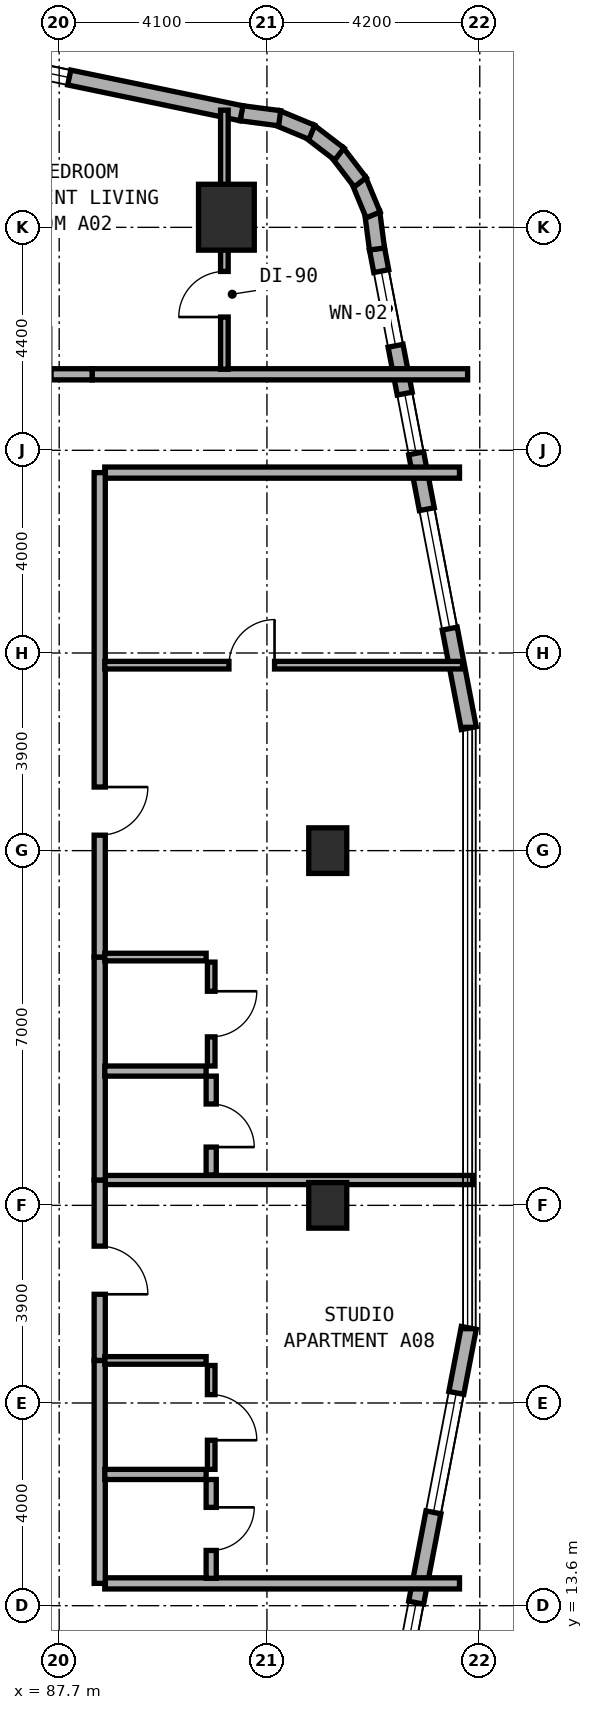
"""IFC4 building model, lengths in metres.
Left out: names, types, materials, properties, quantities, classifications, styles, units other than length and angle.
Written with IfcOpenShell. Run it as: python <this file> out.ifc"""

import sys

from ifc_helpers import new_model, si_unit, direction, frame, frame_2d, origin, origin_2d, place, context, subcontext, project, spatial, rectangle, extrude, element, fill, save


model = new_model("IFC4")
c1 = context("Model", 3, precision=1e-05, world=origin(), true_north=direction((0.0, 1.0)))
c2 = subcontext(c1, "Body", "Model", "MODEL_VIEW")
j1 = project(units=[si_unit("LENGTHUNIT", "METRE"), si_unit("PLANEANGLEUNIT", "RADIAN")], contexts=[c1])
p1 = place(None, origin())
s1 = spatial("IfcSite", under=j1, at=p1, CompositionType="ELEMENT")
p2 = place(p1, origin())
s2 = spatial("IfcBuilding", under=s1, at=p2, CompositionType="ELEMENT")
p3 = place(p2, frame((0.0, 0.0, 38.0)))
s3 = spatial("IfcBuildingStorey", under=s2, at=p3, CompositionType="ELEMENT", Elevation=38.0)
for number, where, z_axis, x_axis in (
    (1, (93.0, 21.5, 0.0), (0.0, 0.0, 1.0), (1.0, 0.0, 0.0)),
    (2, (93.0, 28.5, 0.0), (0.0, 0.0, 1.0), (1.0, 0.0, 0.0)),
):
    element("IfcColumn", number, at=place(p3, frame(where, z_axis=z_axis, x_axis=x_axis)), inside=s3, PredefinedType="COLUMN", context=c2, shape_type="SweptSolid", body=[
        extrude(rectangle(XDim=0.75, YDim=0.9, at=origin_2d()), origin(), (0.0, 0.0, 1.0), 3.5),
    ])
p4 = place(p3, frame((91.0, 41.0, 0.0), z_axis=(0.0, 0.0, 1.0), x_axis=(1.0, 0.0, 0.0)))
e3 = element("IfcColumn", 3, at=p4, inside=s3, PredefinedType="COLUMN", context=c2, shape_type="SweptSolid", body=[
    extrude(rectangle(XDim=1.1, YDim=1.3, at=origin_2d()), origin(), (0.0, 0.0, 1.0), 3.5),
])
p5 = place(p3, frame((93.971, 9.62, 0.0), z_axis=(0.0, 0.0, 1.0), x_axis=(0.188087874316, 0.982152203854, 0.0)))
e4 = element("IfcWall", 4, at=p5, inside=s3, PredefinedType="STANDARD", context=c2, shape_type="SweptSolid", body=[
    extrude(rectangle(XDim=9.634, YDim=0.3, at=frame_2d((4.817, 0.0))), origin(), (0.0, 0.0, 1.0), 3.25),
])
p6 = place(p5, frame((0.452, 0.0, 0.85)))
e5 = element("IfcOpeningElement", 5, at=p6, cuts=e4, PredefinedType="OPENING", context=c2, shape_type="SweptSolid", body=[
    extrude(rectangle(XDim=1.5, YDim=1.5, at=frame_2d((0.75, 0.75))), frame((0.0, 0.16, 0.0), z_axis=(0.0, -1.0, 0.0), x_axis=(1.0, 0.0, 0.0)), (0.0, 0.0, 1.0), 0.32),
])
p7 = place(p5, frame((2.913, 0.0, 0.85)))
e6 = element("IfcOpeningElement", 6, at=p7, cuts=e4, PredefinedType="OPENING", context=c2, shape_type="SweptSolid", body=[
    extrude(rectangle(XDim=1.2, YDim=1.5, at=frame_2d((0.6, 0.75))), frame((0.0, 0.16, 0.0), z_axis=(0.0, -1.0, 0.0), x_axis=(1.0, 0.0, 0.0)), (0.0, 0.0, 1.0), 0.32),
])
p8 = place(p5, frame((5.928, 0.0, 0.8)))
e7 = element("IfcOpeningElement", 7, at=p8, cuts=e4, PredefinedType="OPENING", context=c2, shape_type="SweptSolid", body=[
    extrude(rectangle(XDim=2.4, YDim=1.6, at=frame_2d((1.2, 0.8))), frame((0.0, 0.16, 0.0), z_axis=(0.0, -1.0, 0.0), x_axis=(1.0, 0.0, 0.0)), (0.0, 0.0, 1.0), 0.32),
])
p9 = place(p3, frame((95.783, 30.918, 0.0), z_axis=(0.0, 0.0, 1.0), x_axis=(-0.188087874316, 0.982152203854, 0.0)))
e8 = element("IfcWall", 8, at=p9, inside=s3, PredefinedType="STANDARD", context=c2, shape_type="SweptSolid", body=[
    extrude(rectangle(XDim=9.634, YDim=0.3, at=frame_2d((4.817, 0.0))), origin(), (0.0, 0.0, 1.0), 3.25),
])
p10 = place(p9, frame((1.999, 0.0, 0.8)))
e9 = element("IfcOpeningElement", 9, at=p10, cuts=e8, PredefinedType="OPENING", context=c2, shape_type="SweptSolid", body=[
    extrude(rectangle(XDim=2.4, YDim=1.6, at=frame_2d((1.2, 0.8))), frame((0.0, 0.16, 0.0), z_axis=(0.0, -1.0, 0.0), x_axis=(1.0, 0.0, 0.0)), (0.0, 0.0, 1.0), 0.32),
])
p11 = place(p9, frame((5.521, 0.0, 0.85)))
e10 = element("IfcOpeningElement", 10, at=p11, cuts=e8, PredefinedType="OPENING", context=c2, shape_type="SweptSolid", body=[
    extrude(rectangle(XDim=1.2, YDim=1.5, at=frame_2d((0.6, 0.75))), frame((0.0, 0.16, 0.0), z_axis=(0.0, -1.0, 0.0), x_axis=(1.0, 0.0, 0.0)), (0.0, 0.0, 1.0), 0.32),
])
p12 = place(p9, frame((7.682, 0.0, 0.85)))
e11 = element("IfcOpeningElement", 11, at=p12, cuts=e8, PredefinedType="OPENING", context=c2, shape_type="SweptSolid", body=[
    extrude(rectangle(XDim=1.5, YDim=1.5, at=frame_2d((0.75, 0.75))), frame((0.0, 0.16, 0.0), z_axis=(0.0, -1.0, 0.0), x_axis=(1.0, 0.0, 0.0)), (0.0, 0.0, 1.0), 0.32),
])
p13 = place(p3, frame((93.972, 40.373, 0.0), z_axis=(0.0, 0.0, 1.0), x_axis=(-0.130255288807, 0.991480488834, 0.0)))
e12 = element("IfcWall", 12, at=p13, inside=s3, PredefinedType="STANDARD", context=c2, shape_type="SweptSolid", body=[
    extrude(rectangle(XDim=0.729, YDim=0.3, at=frame_2d((0.365, 0.0))), origin(), (0.0, 0.0, 1.0), 3.25),
])
p14 = place(p3, frame((93.896, 41.045, 0.0), z_axis=(0.0, 0.0, 1.0), x_axis=(-0.383267045233, 0.923637576129, 0.0)))
e13 = element("IfcWall", 13, at=p14, inside=s3, PredefinedType="STANDARD", context=c2, shape_type="SweptSolid", body=[
    extrude(rectangle(XDim=0.746, YDim=0.3, at=frame_2d((0.373, 0.0))), origin(), (0.0, 0.0, 1.0), 3.25),
])
for number, where, z_axis, x_axis in (
    (14, (93.641, 41.689, 0.0), (0.0, 0.0, 1.0), (-0.609, 0.793, 0.0)),
    (15, (93.229, 42.246, 0.0), (0.0, 0.0, 1.0), (-0.794, 0.608, 0.0)),
):
    element("IfcWall", number, at=place(p3, frame(where, z_axis=z_axis, x_axis=x_axis)), inside=s3, PredefinedType="STANDARD", context=c2, shape_type="SweptSolid", body=[
        extrude(rectangle(XDim=0.746, YDim=0.3, at=frame_2d((0.373, 0.0))), origin(), (0.0, 0.0, 1.0), 3.25),
    ])
p15 = place(p3, frame((92.686, 42.676, 0.0), z_axis=(0.0, 0.0, 1.0), x_axis=(-0.923637576129, 0.383267045233, 0.0)))
e16 = element("IfcWall", 16, at=p15, inside=s3, PredefinedType="STANDARD", context=c2, shape_type="SweptSolid", body=[
    extrude(rectangle(XDim=0.746, YDim=0.3, at=frame_2d((0.373, 0.0))), origin(), (0.0, 0.0, 1.0), 3.25),
])
p16 = place(p3, frame((92.051, 42.953, 0.0), z_axis=(0.0, 0.0, 1.0), x_axis=(-0.991559404866, 0.129653178221, 0.0)))
e17 = element("IfcWall", 17, at=p16, inside=s3, PredefinedType="STANDARD", context=c2, shape_type="SweptSolid", body=[
    extrude(rectangle(XDim=0.764, YDim=0.3, at=frame_2d((0.382, 0.0))), origin(), (0.0, 0.0, 1.0), 3.25),
])
p17 = place(p3, frame((91.298, 43.051, 0.0), z_axis=(0.0, 0.0, 1.0), x_axis=(-0.979128391325, 0.203242695569, 0.0)))
e18 = element("IfcWall", 18, at=p17, inside=s3, PredefinedType="STANDARD", context=c2, shape_type="SweptSolid", body=[
    extrude(rectangle(XDim=8.92, YDim=0.3, at=frame_2d((4.46, 0.0))), origin(), (0.0, 0.0, 1.0), 3.25),
])
p18 = place(p17, frame((3.472, 0.0, 0.8)))
e19 = element("IfcOpeningElement", 19, at=p18, cuts=e18, PredefinedType="OPENING", context=c2, shape_type="SweptSolid", body=[
    extrude(rectangle(XDim=2.4, YDim=1.6, at=frame_2d((1.2, 0.8))), frame((0.0, 0.16, 0.0), z_axis=(0.0, -1.0, 0.0), x_axis=(1.0, 0.0, 0.0)), (0.0, 0.0, 1.0), 0.32),
])
p19 = place(p3, frame((88.35, 37.9, 0.0), z_axis=(0.0, 0.0, 1.0), x_axis=(1.0, 0.0, 0.0)))
e20 = element("IfcWall", 20, at=p19, inside=s3, PredefinedType="SOLIDWALL", context=c2, shape_type="SweptSolid", body=[
    extrude(rectangle(XDim=7.41, YDim=0.22, at=frame_2d((3.705, 0.0))), origin(), (0.0, 0.0, 1.0), 2.865),
])
p20 = place(p3, frame((85.78, 37.9, 0.0), z_axis=(0.0, 0.0, 1.0), x_axis=(1.0, 0.0, 0.0)))
e21 = element("IfcWall", 21, at=p20, inside=s3, PredefinedType="SOLIDWALL", context=c2, shape_type="SweptSolid", body=[
    extrude(rectangle(XDim=2.57, YDim=0.22, at=frame_2d((1.285, 0.0))), origin(), (0.0, 0.0, 1.0), 3.22),
])
p21 = place(p20, frame((0.81, 0.0, 0.0)))
e22 = element("IfcOpeningElement", 22, at=p21, cuts=e21, PredefinedType="OPENING", context=c2, shape_type="SweptSolid", body=[
    extrude(rectangle(XDim=0.95, YDim=2.1, at=frame_2d((0.475, 1.05))), frame((0.0, 0.12, 0.0), z_axis=(0.0, -1.0, 0.0), x_axis=(1.0, 0.0, 0.0)), (0.0, 0.0, 1.0), 0.24),
])
p22 = place(p3, frame((90.96, 38.0, 0.0), z_axis=(0.0, 0.0, 1.0), x_axis=(0.0, 1.0, 0.0)))
e23 = element("IfcWall", 23, at=p22, inside=s3, PredefinedType="PARTITIONING", context=c2, shape_type="SweptSolid", body=[
    extrude(rectangle(XDim=5.113, YDim=0.15, at=frame_2d((2.557, 0.0))), origin(), (0.0, 0.0, 1.0), 2.865),
])
p23 = place(p22, frame((1.03, 0.0, 0.0)))
e24 = element("IfcOpeningElement", 24, at=p23, cuts=e23, PredefinedType="OPENING", context=c2, shape_type="SweptSolid", body=[
    extrude(rectangle(XDim=0.9, YDim=2.1, at=frame_2d((0.45, 1.05))), frame((0.0, 0.085, 0.0), z_axis=(0.0, -1.0, 0.0), x_axis=(1.0, 0.0, 0.0)), (0.0, 0.0, 1.0), 0.17),
])
for number, where, z_axis, x_axis in (
    (25, (88.6, 14.04, 0.0), (0.0, 0.0, 1.0), (1.0, 0.0, 0.0)),
    (26, (88.6, 35.96, 0.0), (0.0, 0.0, 1.0), (1.0, 0.0, 0.0)),
):
    element("IfcWall", number, at=place(p3, frame(where, z_axis=z_axis, x_axis=x_axis)), inside=s3, PredefinedType="SOLIDWALL", context=c2, shape_type="SweptSolid", body=[
        extrude(rectangle(XDim=7.0, YDim=0.22, at=frame_2d((3.5, 0.0))), origin(), (0.0, 0.0, 1.0), 2.865),
    ])
p24 = place(p3, frame((88.5, 22.0, 0.0), z_axis=(0.0, 0.0, 1.0), x_axis=(1.0, 0.0, 0.0)))
e27 = element("IfcWall", 27, at=p24, inside=s3, PredefinedType="SOLIDWALL", context=c2, shape_type="SweptSolid", body=[
    extrude(rectangle(XDim=7.36, YDim=0.18, at=frame_2d((3.68, 0.0))), origin(), (0.0, 0.0, 1.0), 2.865),
])
p25 = place(p3, frame((88.5, 14.04, 0.0), z_axis=(0.0, 0.0, 1.0), x_axis=(0.0, 1.0, 0.0)))
e28 = element("IfcWall", 28, at=p25, inside=s3, PredefinedType="SOLIDWALL", context=c2, shape_type="SweptSolid", body=[
    extrude(rectangle(XDim=4.4, YDim=0.22, at=frame_2d((2.2, 0.0))), origin(), (0.0, 0.0, 1.0), 3.22),
])
p26 = place(p3, frame((88.5, 18.44, 0.0), z_axis=(0.0, 0.0, 1.0), x_axis=(0.0, 1.0, 0.0)))
e29 = element("IfcWall", 29, at=p26, inside=s3, PredefinedType="SOLIDWALL", context=c2, shape_type="SweptSolid", body=[
    extrude(rectangle(XDim=3.56, YDim=0.22, at=frame_2d((1.78, 0.0))), origin(), (0.0, 0.0, 1.0), 2.725),
])
p27 = place(p26, frame((1.305, 0.0, 0.0)))
e30 = element("IfcOpeningElement", 30, at=p27, cuts=e29, PredefinedType="OPENING", context=c2, shape_type="SweptSolid", body=[
    extrude(rectangle(XDim=0.95, YDim=2.1, at=frame_2d((0.475, 1.05))), frame((0.0, 0.12, 0.0), z_axis=(0.0, -1.0, 0.0), x_axis=(1.0, 0.0, 0.0)), (0.0, 0.0, 1.0), 0.24),
])
p28 = place(p3, frame((88.6, 16.19, 0.0), z_axis=(0.0, 0.0, 1.0), x_axis=(1.0, 0.0, 0.0)))
e31 = element("IfcWall", 31, at=p28, inside=s3, PredefinedType="PLUMBINGWALL", context=c2, shape_type="SweptSolid", body=[
    extrude(rectangle(XDim=2.0, YDim=0.2, at=frame_2d((1.0, 0.0))), origin(), (0.0, 0.0, 1.0), 3.22),
])
p29 = place(p3, frame((88.6, 18.44, 0.0), z_axis=(0.0, 0.0, 1.0), x_axis=(1.0, 0.0, 0.0)))
e32 = element("IfcWall", 32, at=p29, inside=s3, PredefinedType="PARTITIONING", context=c2, shape_type="SweptSolid", body=[
    extrude(rectangle(XDim=2.0, YDim=0.15, at=frame_2d((1.0, 0.0))), origin(), (0.0, 0.0, 1.0), 3.22),
])
p30 = place(p3, frame((90.7, 14.14, 0.0), z_axis=(0.0, 0.0, 1.0), x_axis=(0.0, 1.0, 0.0)))
e33 = element("IfcWall", 33, at=p30, inside=s3, PredefinedType="PLUMBINGWALL", context=c2, shape_type="SweptSolid", body=[
    extrude(rectangle(XDim=1.95, YDim=0.2, at=frame_2d((0.975, 0.0))), origin(), (0.0, 0.0, 1.0), 3.22),
])
p31 = place(p30, frame((0.55, 0.0, 0.0)))
e34 = element("IfcOpeningElement", 34, at=p31, cuts=e33, PredefinedType="OPENING", context=c2, shape_type="SweptSolid", body=[
    extrude(rectangle(XDim=0.85, YDim=2.1, at=frame_2d((0.425, 1.05))), frame((0.0, 0.11, 0.0), z_axis=(0.0, -1.0, 0.0), x_axis=(1.0, 0.0, 0.0)), (0.0, 0.0, 1.0), 0.22),
])
p32 = place(p3, frame((90.7, 16.29, 0.0), z_axis=(0.0, 0.0, 1.0), x_axis=(0.0, 1.0, 0.0)))
e35 = element("IfcWall", 35, at=p32, inside=s3, PredefinedType="PARTITIONING", context=c2, shape_type="SweptSolid", body=[
    extrude(rectangle(XDim=2.05, YDim=0.15, at=frame_2d((1.025, 0.0))), origin(), (0.0, 0.0, 1.0), 3.22),
])
p33 = place(p32, frame((0.575, 0.0, 0.0)))
e36 = element("IfcOpeningElement", 36, at=p33, cuts=e35, PredefinedType="OPENING", context=c2, shape_type="SweptSolid", body=[
    extrude(rectangle(XDim=0.9, YDim=2.1, at=frame_2d((0.45, 1.05))), frame((0.0, 0.085, 0.0), z_axis=(0.0, -1.0, 0.0), x_axis=(1.0, 0.0, 0.0)), (0.0, 0.0, 1.0), 0.17),
])
p34 = place(p3, frame((88.5, 22.0, 0.0), z_axis=(0.0, 0.0, 1.0), x_axis=(0.0, 1.0, 0.0)))
e37 = element("IfcWall", 37, at=p34, inside=s3, PredefinedType="SOLIDWALL", context=c2, shape_type="SweptSolid", body=[
    extrude(rectangle(XDim=4.4, YDim=0.22, at=frame_2d((2.2, 0.0))), origin(), (0.0, 0.0, 1.0), 3.22),
])
p35 = place(p3, frame((88.5, 26.4, 0.0), z_axis=(0.0, 0.0, 1.0), x_axis=(0.0, 1.0, 0.0)))
e38 = element("IfcWall", 38, at=p35, inside=s3, PredefinedType="SOLIDWALL", context=c2, shape_type="SweptSolid", body=[
    extrude(rectangle(XDim=9.56, YDim=0.22, at=frame_2d((4.78, 0.0))), origin(), (0.0, 0.0, 1.0), 2.725),
])
p36 = place(p35, frame((2.405, 0.0, 0.0)))
e39 = element("IfcOpeningElement", 39, at=p36, cuts=e38, PredefinedType="OPENING", context=c2, shape_type="SweptSolid", body=[
    extrude(rectangle(XDim=0.95, YDim=2.1, at=frame_2d((0.475, 1.05))), frame((0.0, 0.12, 0.0), z_axis=(0.0, -1.0, 0.0), x_axis=(1.0, 0.0, 0.0)), (0.0, 0.0, 1.0), 0.24),
])
p37 = place(p3, frame((88.6, 32.16, 0.0), z_axis=(0.0, 0.0, 1.0), x_axis=(1.0, 0.0, 0.0)))
e40 = element("IfcWall", 40, at=p37, inside=s3, PredefinedType="PARTITIONING", context=c2, shape_type="SweptSolid", body=[
    extrude(rectangle(XDim=7.06, YDim=0.15, at=frame_2d((3.53, 0.0))), origin(), (0.0, 0.0, 1.0), 2.865),
])
p38 = place(p37, frame((2.45, 0.0, 0.0)))
e41 = element("IfcOpeningElement", 41, at=p38, cuts=e40, PredefinedType="OPENING", context=c2, shape_type="SweptSolid", body=[
    extrude(rectangle(XDim=0.9, YDim=2.1, at=frame_2d((0.45, 1.05))), frame((0.0, 0.085, 0.0), z_axis=(0.0, -1.0, 0.0), x_axis=(1.0, 0.0, 0.0)), (0.0, 0.0, 1.0), 0.17),
])
p39 = place(p3, frame((88.6, 24.15, 0.0), z_axis=(0.0, 0.0, 1.0), x_axis=(1.0, 0.0, 0.0)))
e42 = element("IfcWall", 42, at=p39, inside=s3, PredefinedType="PLUMBINGWALL", context=c2, shape_type="SweptSolid", body=[
    extrude(rectangle(XDim=2.0, YDim=0.2, at=frame_2d((1.0, 0.0))), origin(), (0.0, 0.0, 1.0), 3.22),
])
p40 = place(p3, frame((88.6, 26.4, 0.0), z_axis=(0.0, 0.0, 1.0), x_axis=(1.0, 0.0, 0.0)))
e43 = element("IfcWall", 43, at=p40, inside=s3, PredefinedType="PARTITIONING", context=c2, shape_type="SweptSolid", body=[
    extrude(rectangle(XDim=2.0, YDim=0.15, at=frame_2d((1.0, 0.0))), origin(), (0.0, 0.0, 1.0), 3.22),
])
p41 = place(p3, frame((90.7, 22.1, 0.0), z_axis=(0.0, 0.0, 1.0), x_axis=(0.0, 1.0, 0.0)))
e44 = element("IfcWall", 44, at=p41, inside=s3, PredefinedType="PLUMBINGWALL", context=c2, shape_type="SweptSolid", body=[
    extrude(rectangle(XDim=1.95, YDim=0.2, at=frame_2d((0.975, 0.0))), origin(), (0.0, 0.0, 1.0), 3.22),
])
p42 = place(p41, frame((0.55, 0.0, 0.0)))
e45 = element("IfcOpeningElement", 45, at=p42, cuts=e44, PredefinedType="OPENING", context=c2, shape_type="SweptSolid", body=[
    extrude(rectangle(XDim=0.85, YDim=2.1, at=frame_2d((0.425, 1.05))), frame((0.0, 0.11, 0.0), z_axis=(0.0, -1.0, 0.0), x_axis=(1.0, 0.0, 0.0)), (0.0, 0.0, 1.0), 0.22),
])
p43 = place(p3, frame((90.7, 24.25, 0.0), z_axis=(0.0, 0.0, 1.0), x_axis=(0.0, 1.0, 0.0)))
e46 = element("IfcWall", 46, at=p43, inside=s3, PredefinedType="PARTITIONING", context=c2, shape_type="SweptSolid", body=[
    extrude(rectangle(XDim=2.05, YDim=0.15, at=frame_2d((1.025, 0.0))), origin(), (0.0, 0.0, 1.0), 3.22),
])
p44 = place(p43, frame((0.575, 0.0, 0.0)))
e47 = element("IfcOpeningElement", 47, at=p44, cuts=e46, PredefinedType="OPENING", context=c2, shape_type="SweptSolid", body=[
    extrude(rectangle(XDim=0.9, YDim=2.1, at=frame_2d((0.45, 1.05))), frame((0.0, 0.085, 0.0), z_axis=(0.0, -1.0, 0.0), x_axis=(1.0, 0.0, 0.0)), (0.0, 0.0, 1.0), 0.17),
])
p45 = place(p7, origin())
e48 = element("IfcWindow", 48, at=p45, inside=s3, PartitioningType="SINGLE_PANEL", PredefinedType="WINDOW", context=c2, shape_type="SweptSolid", body=[
    extrude(rectangle(XDim=1.2, YDim=1.5, at=frame_2d((0.6, 0.75))), frame((0.0, 0.03, 0.0), z_axis=(0.0, -1.0, 0.0), x_axis=(1.0, 0.0, 0.0)), (0.0, 0.0, 1.0), 0.06),
])
fill(e6, e48)
p46 = place(p8, origin())
e49 = element("IfcWindow", 49, at=p46, inside=s3, PartitioningType="SINGLE_PANEL", PredefinedType="WINDOW", context=c2, shape_type="SweptSolid", body=[
    extrude(rectangle(XDim=2.4, YDim=1.6, at=frame_2d((1.2, 0.8))), frame((0.0, 0.03, 0.0), z_axis=(0.0, -1.0, 0.0), x_axis=(1.0, 0.0, 0.0)), (0.0, 0.0, 1.0), 0.06),
])
fill(e7, e49)
p47 = place(p10, origin())
e50 = element("IfcWindow", 50, at=p47, inside=s3, PartitioningType="SINGLE_PANEL", PredefinedType="WINDOW", context=c2, shape_type="SweptSolid", body=[
    extrude(rectangle(XDim=2.4, YDim=1.6, at=frame_2d((1.2, 0.8))), frame((0.0, 0.03, 0.0), z_axis=(0.0, -1.0, 0.0), x_axis=(1.0, 0.0, 0.0)), (0.0, 0.0, 1.0), 0.06),
])
fill(e9, e50)
p48 = place(p11, origin())
e51 = element("IfcWindow", 51, at=p48, inside=s3, PartitioningType="SINGLE_PANEL", PredefinedType="WINDOW", context=c2, shape_type="SweptSolid", body=[
    extrude(rectangle(XDim=1.2, YDim=1.5, at=frame_2d((0.6, 0.75))), frame((0.0, 0.03, 0.0), z_axis=(0.0, -1.0, 0.0), x_axis=(1.0, 0.0, 0.0)), (0.0, 0.0, 1.0), 0.06),
])
fill(e10, e51)
p49 = place(p12, origin())
e52 = element("IfcWindow", 52, at=p49, inside=s3, PartitioningType="SINGLE_PANEL", PredefinedType="WINDOW", context=c2, shape_type="SweptSolid", body=[
    extrude(rectangle(XDim=1.5, YDim=1.5, at=frame_2d((0.75, 0.75))), frame((0.0, 0.03, 0.0), z_axis=(0.0, -1.0, 0.0), x_axis=(1.0, 0.0, 0.0)), (0.0, 0.0, 1.0), 0.06),
])
fill(e11, e52)
p50 = place(p18, origin())
e53 = element("IfcWindow", 53, at=p50, inside=s3, PartitioningType="SINGLE_PANEL", PredefinedType="WINDOW", context=c2, shape_type="SweptSolid", body=[
    extrude(rectangle(XDim=2.4, YDim=1.6, at=frame_2d((1.2, 0.8))), frame((0.0, 0.03, 0.0), z_axis=(0.0, -1.0, 0.0), x_axis=(1.0, 0.0, 0.0)), (0.0, 0.0, 1.0), 0.06),
])
fill(e19, e53)
p51 = place(p23, origin())
e54 = element("IfcDoor", 54, at=p51, inside=s3, OperationType="SINGLE_SWING_LEFT", PredefinedType="DOOR", context=c2, shape_type="SweptSolid", body=[
    extrude(rectangle(XDim=0.9, YDim=2.1, at=frame_2d((0.45, 1.05))), frame((0.0, 0.025, 0.0), z_axis=(0.0, -1.0, 0.0), x_axis=(1.0, 0.0, 0.0)), (0.0, 0.0, 1.0), 0.05),
])
fill(e24, e54)
p52 = place(p27, frame((0.95, 0.0, 0.0), z_axis=(0.0, 0.0, 1.0), x_axis=(-1.0, 0.0, 0.0)))
e55 = element("IfcDoor", 55, at=p52, inside=s3, OperationType="SINGLE_SWING_RIGHT", PredefinedType="DOOR", context=c2, shape_type="SweptSolid", body=[
    extrude(rectangle(XDim=0.95, YDim=2.1, at=frame_2d((0.475, 1.05))), frame((0.0, 0.025, 0.0), z_axis=(0.0, -1.0, 0.0), x_axis=(1.0, 0.0, 0.0)), (0.0, 0.0, 1.0), 0.05),
])
fill(e30, e55)
p53 = place(p31, frame((0.85, 0.0, 0.0), z_axis=(0.0, 0.0, 1.0), x_axis=(-1.0, 0.0, 0.0)))
e56 = element("IfcDoor", 56, at=p53, inside=s3, OperationType="SINGLE_SWING_LEFT", PredefinedType="DOOR", context=c2, shape_type="SweptSolid", body=[
    extrude(rectangle(XDim=0.85, YDim=2.1, at=frame_2d((0.425, 1.05))), frame((0.0, 0.025, 0.0), z_axis=(0.0, -1.0, 0.0), x_axis=(1.0, 0.0, 0.0)), (0.0, 0.0, 1.0), 0.05),
])
fill(e34, e56)
p54 = place(p33, frame((0.9, 0.0, 0.0), z_axis=(0.0, 0.0, 1.0), x_axis=(-1.0, 0.0, 0.0)))
e57 = element("IfcDoor", 57, at=p54, inside=s3, OperationType="SINGLE_SWING_RIGHT", PredefinedType="DOOR", context=c2, shape_type="SweptSolid", body=[
    extrude(rectangle(XDim=0.9, YDim=2.1, at=frame_2d((0.45, 1.05))), frame((0.0, 0.025, 0.0), z_axis=(0.0, -1.0, 0.0), x_axis=(1.0, 0.0, 0.0)), (0.0, 0.0, 1.0), 0.05),
])
fill(e36, e57)
p55 = place(p36, frame((0.95, 0.0, 0.0), z_axis=(0.0, 0.0, 1.0), x_axis=(-1.0, 0.0, 0.0)))
e58 = element("IfcDoor", 58, at=p55, inside=s3, OperationType="SINGLE_SWING_LEFT", PredefinedType="DOOR", context=c2, shape_type="SweptSolid", body=[
    extrude(rectangle(XDim=0.95, YDim=2.1, at=frame_2d((0.475, 1.05))), frame((0.0, 0.025, 0.0), z_axis=(0.0, -1.0, 0.0), x_axis=(1.0, 0.0, 0.0)), (0.0, 0.0, 1.0), 0.05),
])
fill(e39, e58)
p56 = place(p38, origin())
e59 = element("IfcDoor", 59, at=p56, inside=s3, OperationType="SINGLE_SWING_RIGHT", PredefinedType="DOOR", context=c2, shape_type="SweptSolid", body=[
    extrude(rectangle(XDim=0.9, YDim=2.1, at=frame_2d((0.45, 1.05))), frame((0.0, 0.025, 0.0), z_axis=(0.0, -1.0, 0.0), x_axis=(1.0, 0.0, 0.0)), (0.0, 0.0, 1.0), 0.05),
])
fill(e41, e59)
p57 = place(p42, frame((0.85, 0.0, 0.0), z_axis=(0.0, 0.0, 1.0), x_axis=(-1.0, 0.0, 0.0)))
e60 = element("IfcDoor", 60, at=p57, inside=s3, OperationType="SINGLE_SWING_RIGHT", PredefinedType="DOOR", context=c2, shape_type="SweptSolid", body=[
    extrude(rectangle(XDim=0.85, YDim=2.1, at=frame_2d((0.425, 1.05))), frame((0.0, 0.025, 0.0), z_axis=(0.0, -1.0, 0.0), x_axis=(1.0, 0.0, 0.0)), (0.0, 0.0, 1.0), 0.05),
])
fill(e45, e60)
p58 = place(p44, frame((0.9, 0.0, 0.0), z_axis=(0.0, 0.0, 1.0), x_axis=(-1.0, 0.0, 0.0)))
e61 = element("IfcDoor", 61, at=p58, inside=s3, OperationType="SINGLE_SWING_LEFT", PredefinedType="DOOR", context=c2, shape_type="SweptSolid", body=[
    extrude(rectangle(XDim=0.9, YDim=2.1, at=frame_2d((0.45, 1.05))), frame((0.0, 0.025, 0.0), z_axis=(0.0, -1.0, 0.0), x_axis=(1.0, 0.0, 0.0)), (0.0, 0.0, 1.0), 0.05),
])
fill(e47, e61)
save(model, sys.argv[1])
